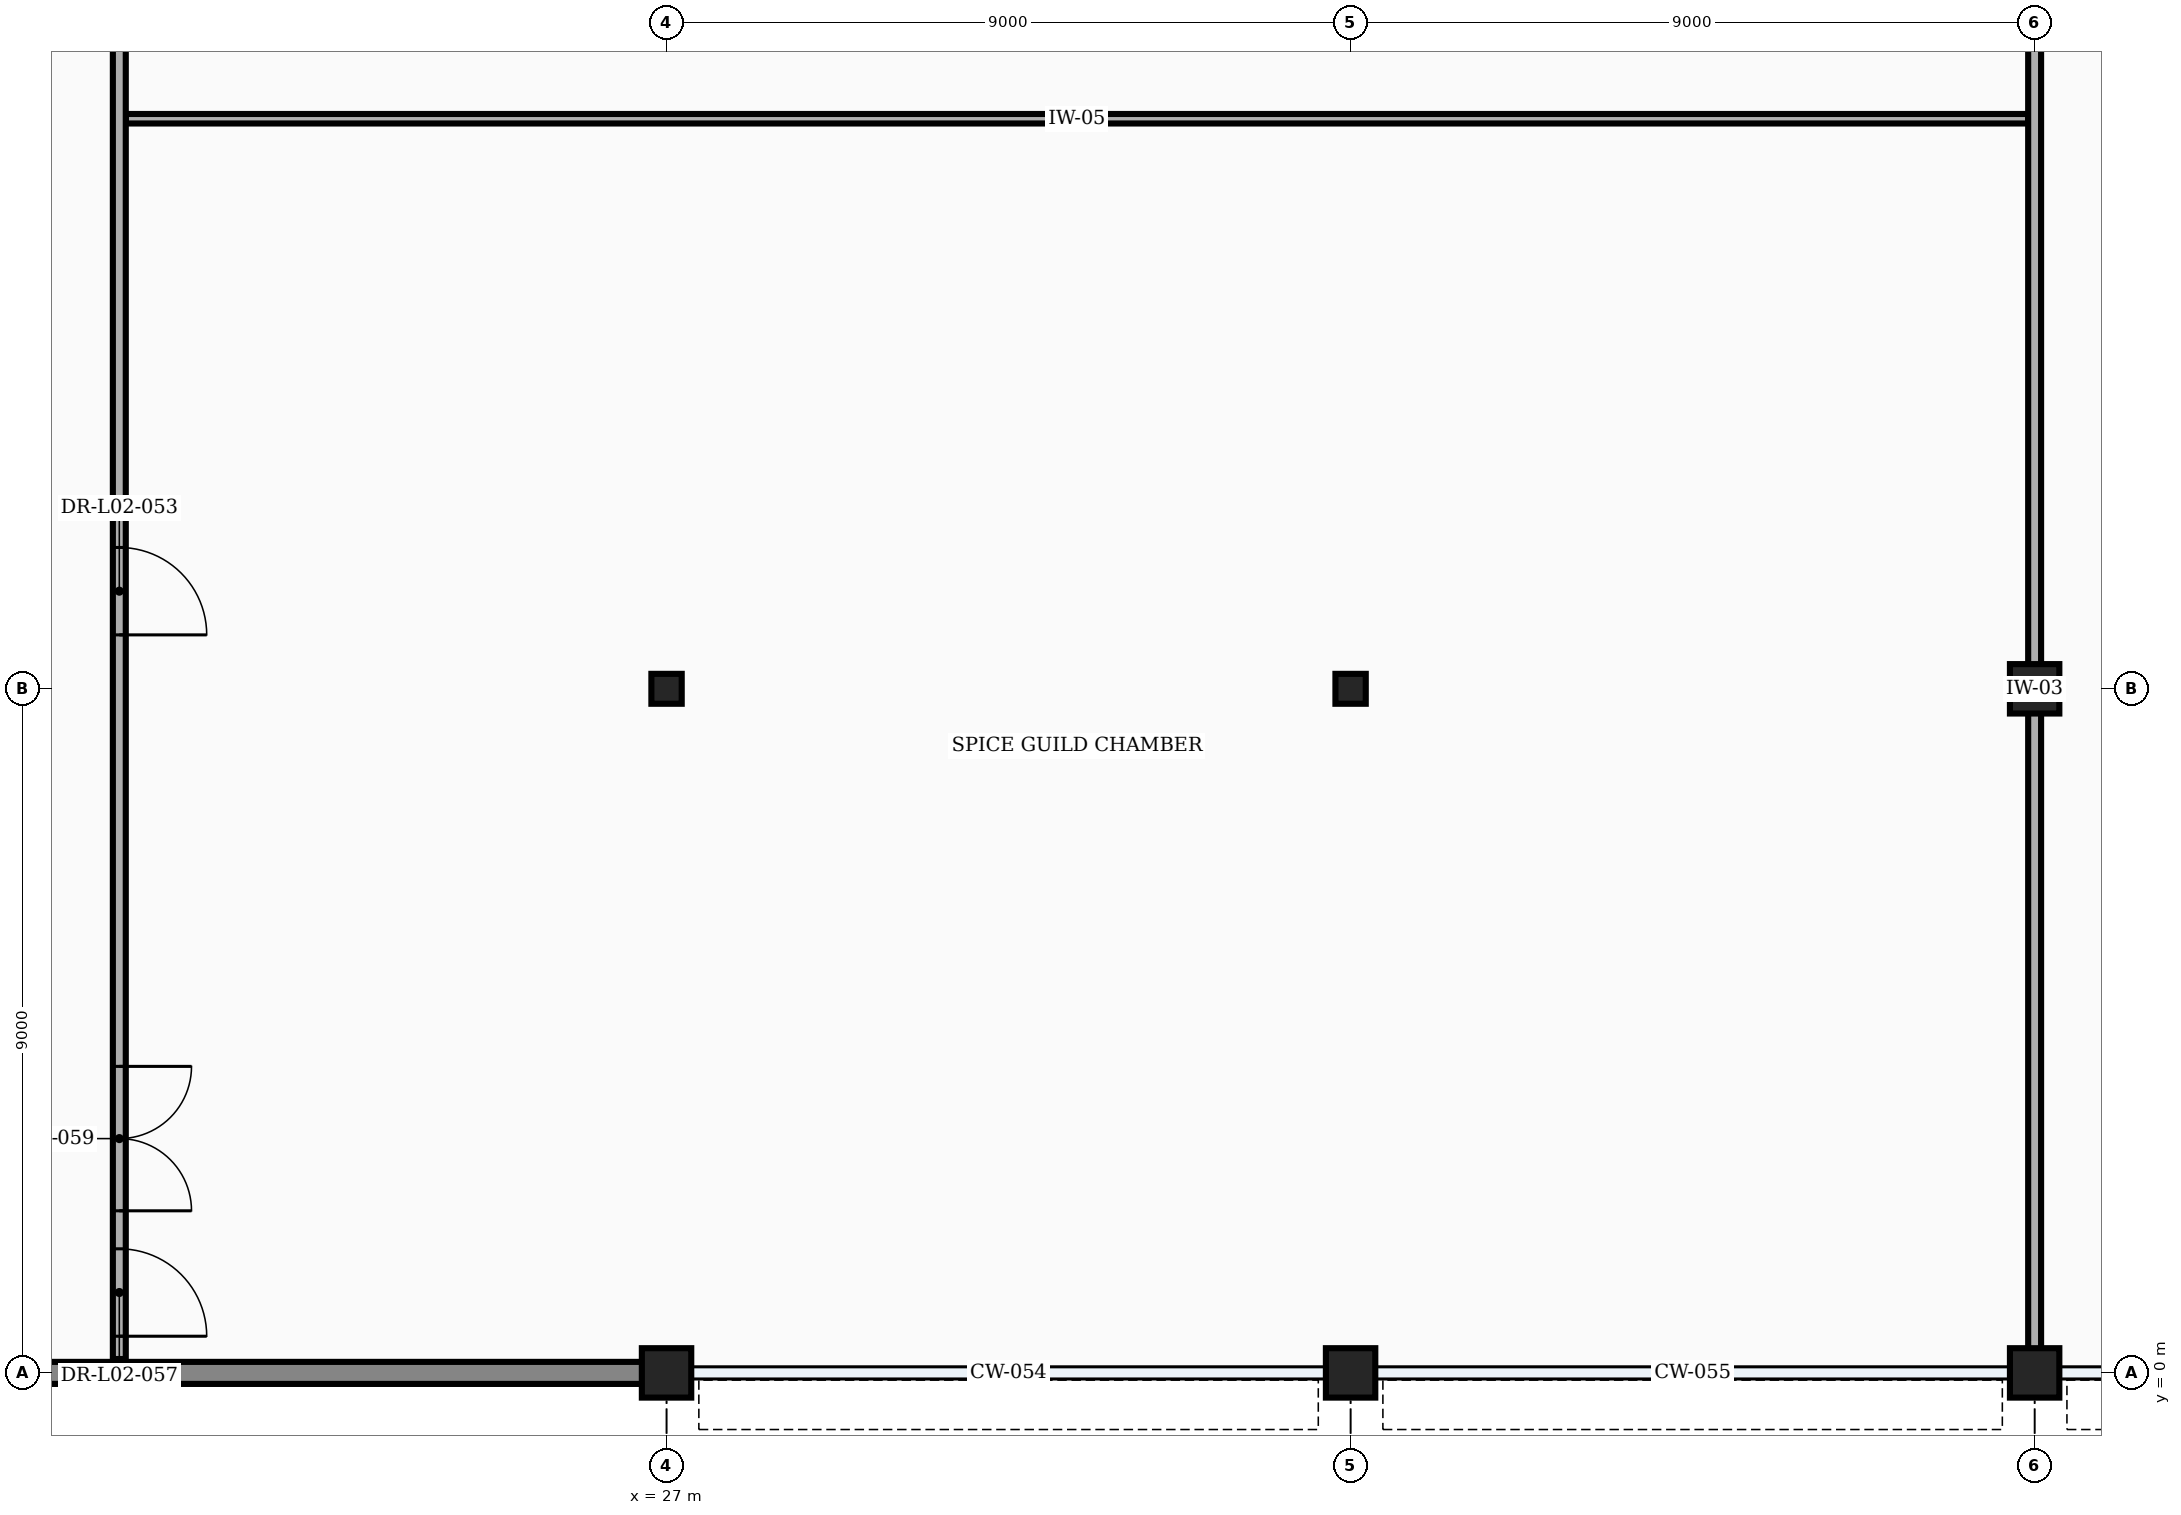
"""IFC4 building model, lengths in metres.
Left out: names, types, materials, properties, quantities, classifications, styles, units other than length and angle.
Written with IfcOpenShell. Run it as: python <this file> out.ifc"""

import sys

from ifc_helpers import new_model, si_unit, direction, frame, frame_2d, origin, origin_2d, place, context, subcontext, project, spatial, rectangle, i_section, extrude, element, fill, save


model = new_model("IFC4")
c1 = context("Model", 3, precision=1e-05, world=origin(), true_north=direction((0.0, 1.0)))
c2 = subcontext(c1, "Body", "Model", "MODEL_VIEW")
j1 = project(units=[si_unit("LENGTHUNIT", "METRE"), si_unit("PLANEANGLEUNIT", "RADIAN")], contexts=[c1])
p1 = place(None, origin())
s1 = spatial("IfcSite", under=j1, at=p1, CompositionType="ELEMENT")
p2 = place(p1, origin())
s2 = spatial("IfcBuilding", under=s1, at=p2, CompositionType="ELEMENT")
p3 = place(p2, frame((0.0, 0.0, 11.4)))
s3 = spatial("IfcBuildingStorey", under=s2, at=p3, CompositionType="ELEMENT", Elevation=11.4)
p4 = place(p3, frame((27.0, 0.0, 0.0), z_axis=(0.0, 0.0, 1.0), x_axis=(1.0, 0.0, 0.0)))
e1 = element("IfcColumn", 1, at=p4, inside=s3, PredefinedType="COLUMN", context=c2, shape_type="SweptSolid", body=[
    extrude(rectangle(XDim=0.65, YDim=0.65, at=origin_2d()), origin(), (0.0, 0.0, 1.0), 5.4),
])
p5 = place(p3, frame((27.0, 9.0, 0.0), z_axis=(0.0, 0.0, 1.0), x_axis=(1.0, 0.0, 0.0)))
e2 = element("IfcColumn", 2, at=p5, inside=s3, PredefinedType="COLUMN", context=c2, shape_type="SweptSolid", body=[
    extrude(i_section(OverallWidth=0.399, OverallDepth=0.394, WebThickness=0.023, FlangeThickness=0.037, at=origin_2d()), origin(), (0.0, 0.0, 1.0), 5.4),
])
p6 = place(p3, frame((36.0, 0.0, 0.0), z_axis=(0.0, 0.0, 1.0), x_axis=(1.0, 0.0, 0.0)))
e3 = element("IfcColumn", 3, at=p6, inside=s3, PredefinedType="COLUMN", context=c2, shape_type="SweptSolid", body=[
    extrude(rectangle(XDim=0.65, YDim=0.65, at=origin_2d()), origin(), (0.0, 0.0, 1.0), 5.4),
])
p7 = place(p3, frame((36.0, 9.0, 0.0), z_axis=(0.0, 0.0, 1.0), x_axis=(1.0, 0.0, 0.0)))
e4 = element("IfcColumn", 4, at=p7, inside=s3, PredefinedType="COLUMN", context=c2, shape_type="SweptSolid", body=[
    extrude(i_section(OverallWidth=0.399, OverallDepth=0.394, WebThickness=0.023, FlangeThickness=0.037, at=origin_2d()), origin(), (0.0, 0.0, 1.0), 5.4),
])
for number, where, z_axis, x_axis in (
    (5, (45.0, 0.0, 0.0), (0.0, 0.0, 1.0), (1.0, 0.0, 0.0)),
    (6, (45.0, 9.0, 0.0), (0.0, 0.0, 1.0), (1.0, 0.0, 0.0)),
):
    element("IfcColumn", number, at=place(p3, frame(where, z_axis=z_axis, x_axis=x_axis)), inside=s3, PredefinedType="COLUMN", context=c2, shape_type="SweptSolid", body=[
        extrude(rectangle(XDim=0.65, YDim=0.65, at=origin_2d()), origin(), (0.0, 0.0, 1.0), 5.4),
    ])
p8 = place(p3, frame((9.317, 0.0, 0.0), z_axis=(0.0, 0.0, 1.0), x_axis=(1.0, 0.0, 0.0)))
e7 = element("IfcWall", 7, at=p8, inside=s3, PredefinedType="STANDARD", context=c2, shape_type="SweptSolid", body=[
    extrude(rectangle(XDim=17.366, YDim=0.29, at=frame_2d((8.683, 0.0))), origin(), (0.0, 0.0, 1.0), 4.388),
])
p9 = place(p8, frame((0.65, 0.0, 0.85)))
e8 = element("IfcOpeningElement", 8, at=p9, cuts=e7, PredefinedType="OPENING", context=c2, shape_type="SweptSolid", body=[
    extrude(rectangle(XDim=2.7, YDim=2.4, at=frame_2d((1.35, 1.2))), frame((0.0, 0.157, 0.0), z_axis=(0.0, -1.0, 0.0), x_axis=(1.0, 0.0, 0.0)), (0.0, 0.0, 1.0), 0.314),
])
p10 = place(p3, frame((19.885, 16.5, 0.0), z_axis=(0.0, 0.0, 1.0), x_axis=(1.0, 0.0, 0.0)))
e9 = element("IfcWall", 9, at=p10, inside=s3, PredefinedType="PARTITIONING", context=c2, shape_type="SweptSolid", body=[
    extrude(rectangle(XDim=25.03, YDim=0.125, at=frame_2d((12.515, 0.0))), origin(), (0.0, 0.0, 1.0), 5.15),
])
p11 = place(p3, frame((19.8, 0.183, 0.0), z_axis=(0.0, 0.0, 1.0), x_axis=(0.0, 1.0, 0.0)))
e10 = element("IfcWall", 10, at=p11, inside=s3, PredefinedType="PARTITIONING", context=c2, shape_type="SweptSolid", body=[
    extrude(rectangle(XDim=39.057, YDim=0.17, at=frame_2d((19.529, 0.0))), origin(), (0.0, 0.0, 1.0), 5.15),
])
p12 = place(p11, frame((9.527, 0.0, 0.0)))
e11 = element("IfcOpeningElement", 11, at=p12, cuts=e10, PredefinedType="OPENING", context=c2, shape_type="SweptSolid", body=[
    extrude(rectangle(XDim=1.15, YDim=2.15, at=frame_2d((0.575, 1.075))), frame((0.0, 0.097, 0.0), z_axis=(0.0, -1.0, 0.0), x_axis=(1.0, 0.0, 0.0)), (0.0, 0.0, 1.0), 0.194),
])
p13 = place(p11, frame((22.527, 0.0, 0.0)))
e12 = element("IfcOpeningElement", 12, at=p13, cuts=e10, PredefinedType="OPENING", context=c2, shape_type="SweptSolid", body=[
    extrude(rectangle(XDim=1.0, YDim=2.15, at=frame_2d((0.5, 1.075))), frame((0.0, 0.097, 0.0), z_axis=(0.0, -1.0, 0.0), x_axis=(1.0, 0.0, 0.0)), (0.0, 0.0, 1.0), 0.194),
])
p14 = place(p11, frame((30.668, 0.0, 0.0)))
e13 = element("IfcOpeningElement", 13, at=p14, cuts=e10, PredefinedType="OPENING", context=c2, shape_type="SweptSolid", body=[
    extrude(rectangle(XDim=1.5, YDim=2.2, at=frame_2d((0.75, 1.1))), frame((0.0, 0.097, 0.0), z_axis=(0.0, -1.0, 0.0), x_axis=(1.0, 0.0, 0.0)), (0.0, 0.0, 1.0), 0.194),
])
p15 = place(p11, frame((18.954, 0.0, 0.0)))
e14 = element("IfcOpeningElement", 14, at=p15, cuts=e10, PredefinedType="OPENING", context=c2, shape_type="SweptSolid", body=[
    extrude(rectangle(XDim=1.15, YDim=2.15, at=frame_2d((0.575, 1.075))), frame((0.0, 0.097, 0.0), z_axis=(0.0, -1.0, 0.0), x_axis=(1.0, 0.0, 0.0)), (0.0, 0.0, 1.0), 0.194),
])
p16 = place(p11, frame((0.3, 0.0, 0.0)))
e15 = element("IfcOpeningElement", 15, at=p16, cuts=e10, PredefinedType="OPENING", context=c2, shape_type="SweptSolid", body=[
    extrude(rectangle(XDim=1.15, YDim=2.15, at=frame_2d((0.575, 1.075))), frame((0.0, 0.097, 0.0), z_axis=(0.0, -1.0, 0.0), x_axis=(1.0, 0.0, 0.0)), (0.0, 0.0, 1.0), 0.194),
])
p17 = place(p11, frame((37.758, 0.0, 0.0)))
e16 = element("IfcOpeningElement", 16, at=p17, cuts=e10, PredefinedType="OPENING", context=c2, shape_type="SweptSolid", body=[
    extrude(rectangle(XDim=1.0, YDim=2.15, at=frame_2d((0.5, 1.075))), frame((0.0, 0.097, 0.0), z_axis=(0.0, -1.0, 0.0), x_axis=(1.0, 0.0, 0.0)), (0.0, 0.0, 1.0), 0.194),
])
p18 = place(p11, frame((1.95, 0.0, 0.0)))
e17 = element("IfcOpeningElement", 17, at=p18, cuts=e10, PredefinedType="OPENING", context=c2, shape_type="SweptSolid", body=[
    extrude(rectangle(XDim=1.9, YDim=2.35, at=frame_2d((0.95, 1.175))), frame((0.0, 0.097, 0.0), z_axis=(0.0, -1.0, 0.0), x_axis=(1.0, 0.0, 0.0)), (0.0, 0.0, 1.0), 0.194),
])
p19 = place(p3, frame((45.0, 0.22, 0.0), z_axis=(0.0, 0.0, 1.0), x_axis=(0.0, 1.0, 0.0)))
e18 = element("IfcWall", 18, at=p19, inside=s3, PredefinedType="PARTITIONING", context=c2, shape_type="SweptSolid", body=[
    extrude(rectangle(XDim=17.56, YDim=0.17, at=frame_2d((8.78, 0.0))), origin(), (0.0, 0.0, 1.0), 4.609),
])
p20 = place(p12, frame((1.15, 0.0, 0.0), z_axis=(0.0, 0.0, 1.0), x_axis=(-1.0, 0.0, 0.0)))
e19 = element("IfcDoor", 19, at=p20, inside=s3, OperationType="SINGLE_SWING_RIGHT", PredefinedType="DOOR", context=c2, shape_type="SweptSolid", body=[
    extrude(rectangle(XDim=1.15, YDim=2.15, at=frame_2d((0.575, 1.075))), frame((0.0, 0.025, 0.0), z_axis=(0.0, -1.0, 0.0), x_axis=(1.0, 0.0, 0.0)), (0.0, 0.0, 1.0), 0.05),
])
fill(e11, e19)
p21 = place(p16, frame((1.15, 0.0, 0.0), z_axis=(0.0, 0.0, 1.0), x_axis=(-1.0, 0.0, 0.0)))
e20 = element("IfcDoor", 20, at=p21, inside=s3, OperationType="SINGLE_SWING_RIGHT", PredefinedType="DOOR", context=c2, shape_type="SweptSolid", body=[
    extrude(rectangle(XDim=1.15, YDim=2.15, at=frame_2d((0.575, 1.075))), frame((0.0, 0.025, 0.0), z_axis=(0.0, -1.0, 0.0), x_axis=(1.0, 0.0, 0.0)), (0.0, 0.0, 1.0), 0.05),
])
fill(e15, e20)
p22 = place(p18, frame((1.9, 0.0, 0.0), z_axis=(0.0, 0.0, 1.0), x_axis=(-1.0, 0.0, 0.0)))
e21 = element("IfcDoor", 21, at=p22, inside=s3, OperationType="DOUBLE_DOOR_SINGLE_SWING", PredefinedType="DOOR", context=c2, shape_type="SweptSolid", body=[
    extrude(rectangle(XDim=1.9, YDim=2.35, at=frame_2d((0.95, 1.175))), frame((0.0, 0.025, 0.0), z_axis=(0.0, -1.0, 0.0), x_axis=(1.0, 0.0, 0.0)), (0.0, 0.0, 1.0), 0.05),
])
fill(e17, e21)
save(model, sys.argv[1])
